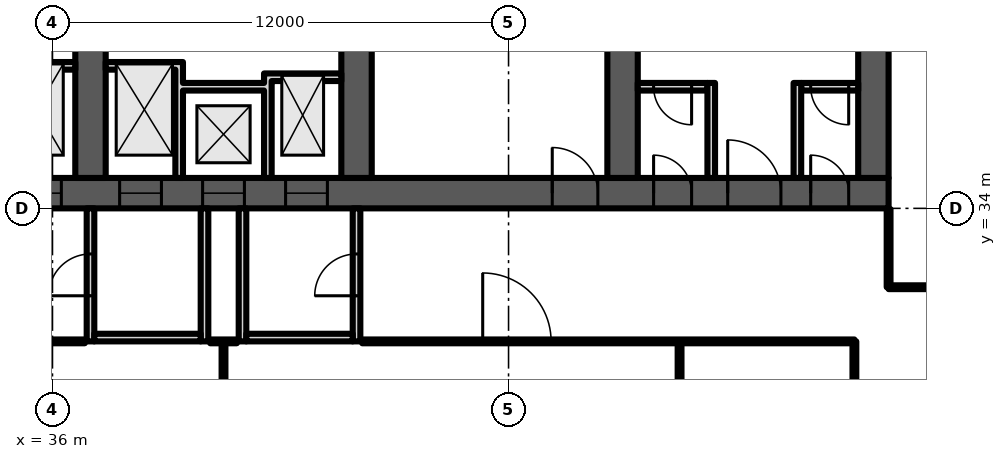
"""IFC4 building model, lengths in metres.
Left out: names, types, materials, properties, quantities, classifications, styles, units other than length and angle.
Written with IfcOpenShell. Run it as: python <this file> out.ifc"""

import sys

from ifc_helpers import new_model, si_unit, direction, frame, frame_2d, origin, place, context, subcontext, project, spatial, polyline, rectangle, outline, extrude, element, fill, save


model = new_model("IFC4")
c1 = context("Model", 3, precision=1e-05, world=origin(), true_north=direction((0.0, 1.0)))
c2 = subcontext(c1, "Body", "Model", "MODEL_VIEW")
j1 = project(units=[si_unit("LENGTHUNIT", "METRE"), si_unit("PLANEANGLEUNIT", "RADIAN")], contexts=[c1])
p1 = place(None, origin())
s1 = spatial("IfcSite", under=j1, at=p1, CompositionType="ELEMENT")
p2 = place(p1, origin())
s2 = spatial("IfcBuilding", under=s1, at=p2, CompositionType="ELEMENT")
p3 = place(p2, frame((0.0, 0.0, 177.1)))
s3 = spatial("IfcBuildingStorey", under=s2, at=p3, CompositionType="ELEMENT", Elevation=177.1)
p4 = place(p3, frame((16.0, 34.4, 0.0), z_axis=(0.0, 0.0, 1.0), x_axis=(1.0, 0.0, 0.0)))
e1 = element("IfcWall", 1, at=p4, inside=s3, PredefinedType="SHEAR", context=c2, shape_type="SweptSolid", body=[
    extrude(rectangle(XDim=42.0, YDim=0.8, at=frame_2d((21.0, 0.0))), origin(), (0.0, 0.0, 1.0), 3.6),
])
p5 = place(p4, frame((1.75, 0.0, 0.0)))
e2 = element("IfcOpeningElement", 2, at=p5, cuts=e1, PredefinedType="OPENING", context=c2, shape_type="SweptSolid", body=[
    extrude(rectangle(XDim=1.0, YDim=2.1, at=frame_2d((0.5, 1.05))), frame((0.0, 0.41, 0.0), z_axis=(0.0, -1.0, 0.0), x_axis=(1.0, 0.0, 0.0)), (0.0, 0.0, 1.0), 0.82),
])
p6 = place(p4, frame((4.65, 0.0, 0.0)))
e3 = element("IfcOpeningElement", 3, at=p6, cuts=e1, PredefinedType="OPENING", context=c2, shape_type="SweptSolid", body=[
    extrude(rectangle(XDim=1.0, YDim=2.1, at=frame_2d((0.5, 1.05))), frame((0.0, 0.41, 0.0), z_axis=(0.0, -1.0, 0.0), x_axis=(1.0, 0.0, 0.0)), (0.0, 0.0, 1.0), 0.82),
])
p7 = place(p4, frame((7.65, 0.0, 0.0)))
e4 = element("IfcOpeningElement", 4, at=p7, cuts=e1, PredefinedType="OPENING", context=c2, shape_type="SweptSolid", body=[
    extrude(rectangle(XDim=1.2, YDim=2.1, at=frame_2d((0.6, 1.05))), frame((0.0, 0.41, 0.0), z_axis=(0.0, -1.0, 0.0), x_axis=(1.0, 0.0, 0.0)), (0.0, 0.0, 1.0), 0.82),
])
p8 = place(p4, frame((14.767, 0.0, 0.0)))
e5 = element("IfcOpeningElement", 5, at=p8, cuts=e1, PredefinedType="OPENING", context=c2, shape_type="SweptSolid", body=[
    extrude(rectangle(XDim=1.1, YDim=2.1, at=frame_2d((0.55, 1.05))), frame((0.0, 0.41, 0.0), z_axis=(0.0, -1.0, 0.0), x_axis=(1.0, 0.0, 0.0)), (0.0, 0.0, 1.0), 0.82),
])
p9 = place(p4, frame((19.133, 0.0, 0.0)))
e6 = element("IfcOpeningElement", 6, at=p9, cuts=e1, PredefinedType="OPENING", context=c2, shape_type="SweptSolid", body=[
    extrude(rectangle(XDim=1.1, YDim=2.1, at=frame_2d((0.55, 1.05))), frame((0.0, 0.41, 0.0), z_axis=(0.0, -1.0, 0.0), x_axis=(1.0, 0.0, 0.0)), (0.0, 0.0, 1.0), 0.82),
])
p10 = place(p4, frame((16.8, 0.0, 0.0)))
e7 = element("IfcOpeningElement", 7, at=p10, cuts=e1, PredefinedType="OPENING", context=c2, shape_type="SweptSolid", body=[
    extrude(rectangle(XDim=1.4, YDim=2.1, at=frame_2d((0.7, 1.05))), frame((0.0, 0.41, 0.0), z_axis=(0.0, -1.0, 0.0), x_axis=(1.0, 0.0, 0.0)), (0.0, 0.0, 1.0), 0.82),
])
p11 = place(p4, frame((21.767, 0.0, 0.0)))
e8 = element("IfcOpeningElement", 8, at=p11, cuts=e1, PredefinedType="OPENING", context=c2, shape_type="SweptSolid", body=[
    extrude(rectangle(XDim=1.1, YDim=2.1, at=frame_2d((0.55, 1.05))), frame((0.0, 0.41, 0.0), z_axis=(0.0, -1.0, 0.0), x_axis=(1.0, 0.0, 0.0)), (0.0, 0.0, 1.0), 0.82),
])
p12 = place(p4, frame((23.95, 0.0, 0.0)))
e9 = element("IfcOpeningElement", 9, at=p12, cuts=e1, PredefinedType="OPENING", context=c2, shape_type="SweptSolid", body=[
    extrude(rectangle(XDim=1.1, YDim=2.1, at=frame_2d((0.55, 1.05))), frame((0.0, 0.41, 0.0), z_axis=(0.0, -1.0, 0.0), x_axis=(1.0, 0.0, 0.0)), (0.0, 0.0, 1.0), 0.82),
])
p13 = place(p4, frame((26.133, 0.0, 0.0)))
e10 = element("IfcOpeningElement", 10, at=p13, cuts=e1, PredefinedType="OPENING", context=c2, shape_type="SweptSolid", body=[
    extrude(rectangle(XDim=1.1, YDim=2.1, at=frame_2d((0.55, 1.05))), frame((0.0, 0.41, 0.0), z_axis=(0.0, -1.0, 0.0), x_axis=(1.0, 0.0, 0.0)), (0.0, 0.0, 1.0), 0.82),
])
p14 = place(p4, frame((33.15, 0.0, 0.0)))
e11 = element("IfcOpeningElement", 11, at=p14, cuts=e1, PredefinedType="OPENING", context=c2, shape_type="SweptSolid", body=[
    extrude(rectangle(XDim=1.2, YDim=2.1, at=frame_2d((0.6, 1.05))), frame((0.0, 0.41, 0.0), z_axis=(0.0, -1.0, 0.0), x_axis=(1.0, 0.0, 0.0)), (0.0, 0.0, 1.0), 0.82),
])
p15 = place(p4, frame((35.817, 0.0, 0.0)))
e12 = element("IfcOpeningElement", 12, at=p15, cuts=e1, PredefinedType="OPENING", context=c2, shape_type="SweptSolid", body=[
    extrude(rectangle(XDim=1.0, YDim=2.1, at=frame_2d((0.5, 1.05))), frame((0.0, 0.41, 0.0), z_axis=(0.0, -1.0, 0.0), x_axis=(1.0, 0.0, 0.0)), (0.0, 0.0, 1.0), 0.82),
])
p16 = place(p4, frame((39.95, 0.0, 0.0)))
e13 = element("IfcOpeningElement", 13, at=p16, cuts=e1, PredefinedType="OPENING", context=c2, shape_type="SweptSolid", body=[
    extrude(rectangle(XDim=1.0, YDim=2.1, at=frame_2d((0.5, 1.05))), frame((0.0, 0.41, 0.0), z_axis=(0.0, -1.0, 0.0), x_axis=(1.0, 0.0, 0.0)), (0.0, 0.0, 1.0), 0.82),
])
p17 = place(p4, frame((37.767, 0.0, 0.0)))
e14 = element("IfcOpeningElement", 14, at=p17, cuts=e1, PredefinedType="OPENING", context=c2, shape_type="SweptSolid", body=[
    extrude(rectangle(XDim=1.4, YDim=2.1, at=frame_2d((0.7, 1.05))), frame((0.0, 0.41, 0.0), z_axis=(0.0, -1.0, 0.0), x_axis=(1.0, 0.0, 0.0)), (0.0, 0.0, 1.0), 0.82),
])
p18 = place(p3, frame((37.0, 34.8, 0.0), z_axis=(0.0, 0.0, 1.0), x_axis=(0.0, 1.0, 0.0)))
e15 = element("IfcWall", 15, at=p18, inside=s3, PredefinedType="SHEAR", context=c2, shape_type="SweptSolid", body=[
    extrude(rectangle(XDim=14.987, YDim=0.8, at=frame_2d((7.493, 0.0))), origin(), (0.0, 0.0, 1.0), 3.6),
])
p19 = place(p18, frame((11.312, 0.0, 0.0)))
e16 = element("IfcOpeningElement", 16, at=p19, cuts=e15, PredefinedType="OPENING", context=c2, shape_type="SweptSolid", body=[
    extrude(rectangle(XDim=1.0, YDim=2.1, at=frame_2d((0.5, 1.05))), frame((0.0, 0.41, 0.0), z_axis=(0.0, -1.0, 0.0), x_axis=(1.0, 0.0, 0.0)), (0.0, 0.0, 1.0), 0.82),
])
p20 = place(p18, frame((3.6, 0.0, 0.0)))
e17 = element("IfcOpeningElement", 17, at=p20, cuts=e15, PredefinedType="OPENING", context=c2, shape_type="SweptSolid", body=[
    extrude(rectangle(XDim=1.1, YDim=2.1, at=frame_2d((0.55, 1.05))), frame((0.0, 0.41, 0.0), z_axis=(0.0, -1.0, 0.0), x_axis=(1.0, 0.0, 0.0)), (0.0, 0.0, 1.0), 0.82),
])
p21 = place(p3, frame((44.0, 34.8, 0.0), z_axis=(0.0, 0.0, 1.0), x_axis=(0.0, 1.0, 0.0)))
e18 = element("IfcWall", 18, at=p21, inside=s3, PredefinedType="SHEAR", context=c2, shape_type="SweptSolid", body=[
    extrude(rectangle(XDim=14.374, YDim=0.8, at=frame_2d((7.187, 0.0))), origin(), (0.0, 0.0, 1.0), 3.6),
])
p22 = place(p21, frame((11.312, 0.0, 0.0)))
e19 = element("IfcOpeningElement", 19, at=p22, cuts=e18, PredefinedType="OPENING", context=c2, shape_type="SweptSolid", body=[
    extrude(rectangle(XDim=1.0, YDim=2.1, at=frame_2d((0.5, 1.05))), frame((0.0, 0.41, 0.0), z_axis=(0.0, -1.0, 0.0), x_axis=(1.0, 0.0, 0.0)), (0.0, 0.0, 1.0), 0.82),
])
p23 = place(p21, frame((3.6, 0.0, 0.0)))
e20 = element("IfcOpeningElement", 20, at=p23, cuts=e18, PredefinedType="OPENING", context=c2, shape_type="SweptSolid", body=[
    extrude(rectangle(XDim=1.1, YDim=2.1, at=frame_2d((0.55, 1.05))), frame((0.0, 0.41, 0.0), z_axis=(0.0, -1.0, 0.0), x_axis=(1.0, 0.0, 0.0)), (0.0, 0.0, 1.0), 0.82),
])
p24 = place(p3, frame((51.0, 34.8, 0.0), z_axis=(0.0, 0.0, 1.0), x_axis=(0.0, 1.0, 0.0)))
e21 = element("IfcWall", 21, at=p24, inside=s3, PredefinedType="SHEAR", context=c2, shape_type="SweptSolid", body=[
    extrude(rectangle(XDim=13.762, YDim=0.8, at=frame_2d((6.881, 0.0))), origin(), (0.0, 0.0, 1.0), 3.6),
])
p25 = place(p24, frame((3.6, 0.0, 0.0)))
e22 = element("IfcOpeningElement", 22, at=p25, cuts=e21, PredefinedType="OPENING", context=c2, shape_type="SweptSolid", body=[
    extrude(rectangle(XDim=1.1, YDim=2.1, at=frame_2d((0.55, 1.05))), frame((0.0, 0.41, 0.0), z_axis=(0.0, -1.0, 0.0), x_axis=(1.0, 0.0, 0.0)), (0.0, 0.0, 1.0), 0.82),
])
p26 = place(p3, frame((57.6, 34.8, 0.0), z_axis=(0.0, 0.0, 1.0), x_axis=(0.0, 1.0, 0.0)))
e23 = element("IfcWall", 23, at=p26, inside=s3, PredefinedType="SHEAR", context=c2, shape_type="SweptSolid", body=[
    extrude(rectangle(XDim=13.184, YDim=0.8, at=frame_2d((6.592, 0.0))), origin(), (0.0, 0.0, 1.0), 3.6),
])
p27 = place(p3, frame((0.0, 0.0, -0.0)))
e24 = element("IfcWall", 24, at=p27, inside=s3, PredefinedType="PARTITIONING", context=c2, shape_type="SweptSolid", body=[
    extrude(outline(polyline([(34.567, 37.85), (34.767, 37.85), (36.6, 37.85), (36.6, 37.65), (34.767, 37.65), (34.767, 34.8), (34.567, 34.8), (34.567, 37.85)])), origin(), (0.0, 0.0, 1.0), 3.2),
])
p28 = place(p3, frame((0.0, 0.0, -0.0)))
e25 = element("IfcWall", 25, at=p28, inside=s3, PredefinedType="PARTITIONING", context=c2, shape_type="SweptSolid", body=[
    extrude(outline(polyline([(41.567, 37.1), (39.433, 37.1), (39.433, 34.8), (39.233, 34.8), (39.233, 37.65), (37.4, 37.65), (37.4, 37.85), (39.233, 37.85), (39.433, 37.85), (39.433, 37.3), (41.567, 37.3), (41.567, 37.55), (41.767, 37.55), (43.6, 37.55), (43.6, 37.35), (41.767, 37.35), (41.767, 34.8), (41.567, 34.8), (41.567, 37.1)])), origin(), (0.0, 0.0, 1.0), 3.2),
])
p29 = place(p3, frame((51.4, 37.2, 0.0), z_axis=(0.0, 0.0, 1.0), x_axis=(1.0, 0.0, 0.0)))
e26 = element("IfcWall", 26, at=p29, inside=s3, PredefinedType="PARTITIONING", context=c2, shape_type="SweptSolid", body=[
    extrude(rectangle(XDim=1.833, YDim=0.2, at=frame_2d((0.917, 0.0))), origin(), (0.0, 0.0, 1.0), 3.2),
])
p30 = place(p29, frame((0.417, 0.0, 0.0)))
e27 = element("IfcOpeningElement", 27, at=p30, cuts=e26, PredefinedType="OPENING", context=c2, shape_type="SweptSolid", body=[
    extrude(rectangle(XDim=1.0, YDim=2.1, at=frame_2d((0.5, 1.05))), frame((0.0, 0.11, 0.0), z_axis=(0.0, -1.0, 0.0), x_axis=(1.0, 0.0, 0.0)), (0.0, 0.0, 1.0), 0.22),
])
p31 = place(p3, frame((55.7, 37.2, 0.0), z_axis=(0.0, 0.0, 1.0), x_axis=(1.0, 0.0, 0.0)))
e28 = element("IfcWall", 28, at=p31, inside=s3, PredefinedType="PARTITIONING", context=c2, shape_type="SweptSolid", body=[
    extrude(rectangle(XDim=1.5, YDim=0.2, at=frame_2d((0.75, 0.0))), origin(), (0.0, 0.0, 1.0), 3.2),
])
p32 = place(p31, frame((0.25, 0.0, 0.0)))
e29 = element("IfcOpeningElement", 29, at=p32, cuts=e28, PredefinedType="OPENING", context=c2, shape_type="SweptSolid", body=[
    extrude(rectangle(XDim=1.0, YDim=2.1, at=frame_2d((0.5, 1.05))), frame((0.0, 0.11, 0.0), z_axis=(0.0, -1.0, 0.0), x_axis=(1.0, 0.0, 0.0)), (0.0, 0.0, 1.0), 0.22),
])
p33 = place(p3, frame((0.0, 0.0, -0.0)))
e30 = element("IfcWall", 30, at=p33, inside=s3, PredefinedType="PARTITIONING", context=c2, shape_type="SweptSolid", body=[
    extrude(outline(polyline([(53.233, 34.8), (53.233, 37.3), (53.433, 37.3), (53.433, 34.8), (53.233, 34.8)])), origin(), (0.0, 0.0, 1.0), 3.2),
])
p34 = place(p3, frame((0.0, 0.0, -0.0)))
e31 = element("IfcWall", 31, at=p34, inside=s3, PredefinedType="PARTITIONING", context=c2, shape_type="SweptSolid", body=[
    extrude(outline(polyline([(55.5, 34.8), (55.5, 37.3), (55.7, 37.3), (55.7, 34.8), (55.5, 34.8)])), origin(), (0.0, 0.0, 1.0), 3.2),
])
p35 = place(p3, frame((37.0, 30.5, 0.0), z_axis=(0.0, 0.0, 1.0), x_axis=(0.0, 1.0, 0.0)))
e32 = element("IfcWall", 32, at=p35, inside=s3, PredefinedType="PARTITIONING", context=c2, shape_type="SweptSolid", body=[
    extrude(rectangle(XDim=3.5, YDim=0.2, at=frame_2d((1.75, 0.0))), origin(), (0.0, 0.0, 1.0), 3.2),
])
p36 = place(p35, frame((1.2, 0.0, 0.0)))
e33 = element("IfcOpeningElement", 33, at=p36, cuts=e32, PredefinedType="OPENING", context=c2, shape_type="SweptSolid", body=[
    extrude(rectangle(XDim=1.1, YDim=2.1, at=frame_2d((0.55, 1.05))), frame((0.0, 0.11, 0.0), z_axis=(0.0, -1.0, 0.0), x_axis=(1.0, 0.0, 0.0)), (0.0, 0.0, 1.0), 0.22),
])
p37 = place(p3, frame((40.0, 30.5, 0.0), z_axis=(0.0, 0.0, 1.0), x_axis=(0.0, 1.0, 0.0)))
e34 = element("IfcWall", 34, at=p37, inside=s3, PredefinedType="PARTITIONING", context=c2, shape_type="SweptSolid", body=[
    extrude(rectangle(XDim=3.5, YDim=0.2, at=frame_2d((1.75, 0.0))), origin(), (0.0, 0.0, 1.0), 3.2),
])
p38 = place(p3, frame((37.1, 30.6, 0.0), z_axis=(0.0, 0.0, 1.0), x_axis=(1.0, 0.0, 0.0)))
e35 = element("IfcWall", 35, at=p38, inside=s3, PredefinedType="PARTITIONING", context=c2, shape_type="SweptSolid", body=[
    extrude(rectangle(XDim=2.8, YDim=0.2, at=frame_2d((1.4, 0.0))), origin(), (0.0, 0.0, 1.0), 3.2),
])
p39 = place(p3, frame((41.0, 30.5, 0.0), z_axis=(0.0, 0.0, 1.0), x_axis=(0.0, 1.0, 0.0)))
e36 = element("IfcWall", 36, at=p39, inside=s3, PredefinedType="PARTITIONING", context=c2, shape_type="SweptSolid", body=[
    extrude(rectangle(XDim=3.5, YDim=0.2, at=frame_2d((1.75, 0.0))), origin(), (0.0, 0.0, 1.0), 3.2),
])
p40 = place(p3, frame((44.0, 30.5, 0.0), z_axis=(0.0, 0.0, 1.0), x_axis=(0.0, 1.0, 0.0)))
e37 = element("IfcWall", 37, at=p40, inside=s3, PredefinedType="PARTITIONING", context=c2, shape_type="SweptSolid", body=[
    extrude(rectangle(XDim=3.5, YDim=0.2, at=frame_2d((1.75, 0.0))), origin(), (0.0, 0.0, 1.0), 3.2),
])
p41 = place(p40, frame((1.2, 0.0, 0.0)))
e38 = element("IfcOpeningElement", 38, at=p41, cuts=e37, PredefinedType="OPENING", context=c2, shape_type="SweptSolid", body=[
    extrude(rectangle(XDim=1.1, YDim=2.1, at=frame_2d((0.55, 1.05))), frame((0.0, 0.11, 0.0), z_axis=(0.0, -1.0, 0.0), x_axis=(1.0, 0.0, 0.0)), (0.0, 0.0, 1.0), 0.22),
])
p42 = place(p3, frame((41.1, 30.6, 0.0), z_axis=(0.0, 0.0, 1.0), x_axis=(1.0, 0.0, 0.0)))
e39 = element("IfcWall", 39, at=p42, inside=s3, PredefinedType="PARTITIONING", context=c2, shape_type="SweptSolid", body=[
    extrude(rectangle(XDim=2.8, YDim=0.2, at=frame_2d((1.4, 0.0))), origin(), (0.0, 0.0, 1.0), 3.2),
])
p43 = place(p3, frame((17.8, 30.5, 0.0), z_axis=(0.0, 0.0, 1.0), x_axis=(1.0, 0.0, 0.0)))
e40 = element("IfcWall", 40, at=p43, inside=s3, PredefinedType="PARTITIONING", context=c2, shape_type="SweptSolid", body=[
    extrude(rectangle(XDim=19.05, YDim=0.1, at=frame_2d((9.525, 0.0))), origin(), (0.0, 0.0, 1.0), 3.2),
])
p44 = place(p3, frame((40.5, 1.489, 0.0), z_axis=(0.0, 0.0, 1.0), x_axis=(0.0, 1.0, 0.0)))
e41 = element("IfcWall", 41, at=p44, inside=s3, PredefinedType="PARTITIONING", context=c2, shape_type="SweptSolid", body=[
    extrude(rectangle(XDim=29.011, YDim=0.1, at=frame_2d((14.505, 0.0))), origin(), (0.0, 0.0, 1.0), 3.2),
])
p45 = place(p3, frame((52.5, 1.98, 0.0), z_axis=(0.0, 0.0, 1.0), x_axis=(0.0, 1.0, 0.0)))
e42 = element("IfcWall", 42, at=p45, inside=s3, PredefinedType="PARTITIONING", context=c2, shape_type="SweptSolid", body=[
    extrude(rectangle(XDim=28.52, YDim=0.1, at=frame_2d((14.26, 0.0))), origin(), (0.0, 0.0, 1.0), 3.2),
])
p46 = place(p3, frame((57.1, 11.985, 0.0), z_axis=(0.0, 0.0, 1.0), x_axis=(0.0, 1.0, 0.0)))
e43 = element("IfcWall", 43, at=p46, inside=s3, PredefinedType="PARTITIONING", context=c2, shape_type="SweptSolid", body=[
    extrude(rectangle(XDim=18.515, YDim=0.1, at=frame_2d((9.257, 0.0))), origin(), (0.0, 0.0, 1.0), 3.2),
])
p47 = place(p46, frame((8.295, 0.0, 0.0)))
e44 = element("IfcOpeningElement", 44, at=p47, cuts=e43, PredefinedType="OPENING", context=c2, shape_type="SweptSolid", body=[
    extrude(rectangle(XDim=1.8, YDim=2.1, at=frame_2d((0.9, 1.05))), frame((0.0, 0.06, 0.0), z_axis=(0.0, -1.0, 0.0), x_axis=(1.0, 0.0, 0.0)), (0.0, 0.0, 1.0), 0.12),
])
p48 = place(p3, frame((58.0, 31.925, 0.0), z_axis=(0.0, 0.0, 1.0), x_axis=(0.0, 1.0, 0.0)))
e45 = element("IfcWall", 45, at=p48, inside=s3, PredefinedType="PARTITIONING", context=c2, shape_type="SweptSolid", body=[
    extrude(rectangle(XDim=2.055, YDim=0.1, at=frame_2d((1.027, 0.0))), origin(), (0.0, 0.0, 1.0), 3.2),
])
p49 = place(p3, frame((58.0, 31.925, 0.0), z_axis=(0.0, 0.0, 1.0), x_axis=(1.0, 0.0, 0.0)))
e46 = element("IfcWall", 46, at=p49, inside=s3, PredefinedType="PARTITIONING", context=c2, shape_type="SweptSolid", body=[
    extrude(rectangle(XDim=1.425, YDim=0.1, at=frame_2d((0.712, 0.0))), origin(), (0.0, 0.0, 1.0), 3.2),
])
p50 = place(p3, frame((58.9, 27.435, 0.0), z_axis=(0.0, 0.0, 1.0), x_axis=(0.178584, 0.983924, 0.0)))
e47 = element("IfcWall", 47, at=p50, inside=s3, PredefinedType="PARTITIONING", context=c2, shape_type="SweptSolid", body=[
    extrude(rectangle(XDim=2.353, YDim=0.1, at=frame_2d((1.176, 0.0))), origin(), (0.0, 0.0, 1.0), 3.2),
])
p51 = place(p3, frame((40.15, 30.5, 0.0), z_axis=(0.0, 0.0, 1.0), x_axis=(1.0, 0.0, 0.0)))
e48 = element("IfcWall", 48, at=p51, inside=s3, PredefinedType="PARTITIONING", context=c2, shape_type="SweptSolid", body=[
    extrude(rectangle(XDim=0.7, YDim=0.1, at=frame_2d((0.35, 0.0))), origin(), (0.0, 0.0, 1.0), 3.2),
])
p52 = place(p3, frame((44.15, 30.5, 0.0), z_axis=(0.0, 0.0, 1.0), x_axis=(1.0, 0.0, 0.0)))
e49 = element("IfcWall", 49, at=p52, inside=s3, PredefinedType="PARTITIONING", context=c2, shape_type="SweptSolid", body=[
    extrude(rectangle(XDim=12.95, YDim=0.1, at=frame_2d((6.475, 0.0))), origin(), (0.0, 0.0, 1.0), 3.2),
])
p53 = place(p52, frame((3.17, 0.0, 0.0)))
e50 = element("IfcOpeningElement", 50, at=p53, cuts=e49, PredefinedType="OPENING", context=c2, shape_type="SweptSolid", body=[
    extrude(rectangle(XDim=1.8, YDim=2.1, at=frame_2d((0.9, 1.05))), frame((0.0, 0.06, 0.0), z_axis=(0.0, -1.0, 0.0), x_axis=(1.0, 0.0, 0.0)), (0.0, 0.0, 1.0), 0.12),
])
p54 = place(p9, origin())
e51 = element("IfcDoor", 51, at=p54, inside=s3, OperationType="DOUBLE_DOOR_SLIDING", PredefinedType="DOOR", context=c2, shape_type="SweptSolid", body=[
    extrude(rectangle(XDim=1.1, YDim=2.1, at=frame_2d((0.55, 1.05))), frame((0.0, 0.025, 0.0), z_axis=(0.0, -1.0, 0.0), x_axis=(1.0, 0.0, 0.0)), (0.0, 0.0, 1.0), 0.05),
])
fill(e6, e51)
p55 = place(p11, origin())
e52 = element("IfcDoor", 52, at=p55, inside=s3, OperationType="DOUBLE_DOOR_SLIDING", PredefinedType="DOOR", context=c2, shape_type="SweptSolid", body=[
    extrude(rectangle(XDim=1.1, YDim=2.1, at=frame_2d((0.55, 1.05))), frame((0.0, 0.025, 0.0), z_axis=(0.0, -1.0, 0.0), x_axis=(1.0, 0.0, 0.0)), (0.0, 0.0, 1.0), 0.05),
])
fill(e8, e52)
p56 = place(p12, origin())
e53 = element("IfcDoor", 53, at=p56, inside=s3, OperationType="DOUBLE_DOOR_SLIDING", PredefinedType="DOOR", context=c2, shape_type="SweptSolid", body=[
    extrude(rectangle(XDim=1.1, YDim=2.1, at=frame_2d((0.55, 1.05))), frame((0.0, 0.025, 0.0), z_axis=(0.0, -1.0, 0.0), x_axis=(1.0, 0.0, 0.0)), (0.0, 0.0, 1.0), 0.05),
])
fill(e9, e53)
p57 = place(p13, origin())
e54 = element("IfcDoor", 54, at=p57, inside=s3, OperationType="DOUBLE_DOOR_SLIDING", PredefinedType="DOOR", context=c2, shape_type="SweptSolid", body=[
    extrude(rectangle(XDim=1.1, YDim=2.1, at=frame_2d((0.55, 1.05))), frame((0.0, 0.025, 0.0), z_axis=(0.0, -1.0, 0.0), x_axis=(1.0, 0.0, 0.0)), (0.0, 0.0, 1.0), 0.05),
])
fill(e10, e54)
p58 = place(p14, origin())
e55 = element("IfcDoor", 55, at=p58, inside=s3, OperationType="SINGLE_SWING_LEFT", PredefinedType="DOOR", context=c2, shape_type="SweptSolid", body=[
    extrude(rectangle(XDim=1.2, YDim=2.1, at=frame_2d((0.6, 1.05))), frame((0.0, 0.025, 0.0), z_axis=(0.0, -1.0, 0.0), x_axis=(1.0, 0.0, 0.0)), (0.0, 0.0, 1.0), 0.05),
])
fill(e11, e55)
p59 = place(p15, origin())
e56 = element("IfcDoor", 56, at=p59, inside=s3, OperationType="SINGLE_SWING_LEFT", PredefinedType="DOOR", context=c2, shape_type="SweptSolid", body=[
    extrude(rectangle(XDim=1.0, YDim=2.1, at=frame_2d((0.5, 1.05))), frame((0.0, 0.4, 0.0), z_axis=(0.0, -1.0, 0.0), x_axis=(1.0, 0.0, 0.0)), (0.0, 0.0, 1.0), 0.8),
])
fill(e12, e56)
p60 = place(p30, origin())
e57 = element("IfcDoor", 57, at=p60, inside=s3, OperationType="SINGLE_SWING_RIGHT", PredefinedType="DOOR", context=c2, shape_type="SweptSolid", body=[
    extrude(rectangle(XDim=1.0, YDim=2.1, at=frame_2d((0.5, 1.05))), frame((0.0, 0.025, 0.0), z_axis=(0.0, -1.0, 0.0), x_axis=(1.0, 0.0, 0.0)), (0.0, 0.0, 1.0), 0.05),
])
fill(e27, e57)
p61 = place(p16, origin())
e58 = element("IfcDoor", 58, at=p61, inside=s3, OperationType="SINGLE_SWING_LEFT", PredefinedType="DOOR", context=c2, shape_type="SweptSolid", body=[
    extrude(rectangle(XDim=1.0, YDim=2.1, at=frame_2d((0.5, 1.05))), frame((0.0, 0.4, 0.0), z_axis=(0.0, -1.0, 0.0), x_axis=(1.0, 0.0, 0.0)), (0.0, 0.0, 1.0), 0.8),
])
fill(e13, e58)
p62 = place(p32, origin())
e59 = element("IfcDoor", 59, at=p62, inside=s3, OperationType="SINGLE_SWING_RIGHT", PredefinedType="DOOR", context=c2, shape_type="SweptSolid", body=[
    extrude(rectangle(XDim=1.0, YDim=2.1, at=frame_2d((0.5, 1.05))), frame((0.0, 0.025, 0.0), z_axis=(0.0, -1.0, 0.0), x_axis=(1.0, 0.0, 0.0)), (0.0, 0.0, 1.0), 0.05),
])
fill(e29, e59)
p63 = place(p17, origin())
e60 = element("IfcDoor", 60, at=p63, inside=s3, OperationType="DOUBLE_DOOR_SINGLE_SWING", PredefinedType="DOOR", context=c2, shape_type="SweptSolid", body=[
    extrude(rectangle(XDim=1.4, YDim=2.1, at=frame_2d((0.7, 1.05))), frame((0.0, 0.025, 0.0), z_axis=(0.0, -1.0, 0.0), x_axis=(1.0, 0.0, 0.0)), (0.0, 0.0, 1.0), 0.05),
])
fill(e14, e60)
p64 = place(p36, origin())
e61 = element("IfcDoor", 61, at=p64, inside=s3, OperationType="SINGLE_SWING_LEFT", PredefinedType="DOOR", context=c2, shape_type="SweptSolid", body=[
    extrude(rectangle(XDim=1.1, YDim=2.1, at=frame_2d((0.55, 1.05))), frame((0.0, 0.025, 0.0), z_axis=(0.0, -1.0, 0.0), x_axis=(1.0, 0.0, 0.0)), (0.0, 0.0, 1.0), 0.05),
])
fill(e33, e61)
p65 = place(p41, origin())
e62 = element("IfcDoor", 62, at=p65, inside=s3, OperationType="SINGLE_SWING_LEFT", PredefinedType="DOOR", context=c2, shape_type="SweptSolid", body=[
    extrude(rectangle(XDim=1.1, YDim=2.1, at=frame_2d((0.55, 1.05))), frame((0.0, 0.025, 0.0), z_axis=(0.0, -1.0, 0.0), x_axis=(1.0, 0.0, 0.0)), (0.0, 0.0, 1.0), 0.05),
])
fill(e38, e62)
p66 = place(p53, origin())
e63 = element("IfcDoor", 63, at=p66, inside=s3, OperationType="DOUBLE_DOOR_SINGLE_SWING", PredefinedType="DOOR", context=c2, shape_type="SweptSolid", body=[
    extrude(rectangle(XDim=1.8, YDim=2.1, at=frame_2d((0.9, 1.05))), frame((0.0, 0.025, 0.0), z_axis=(0.0, -1.0, 0.0), x_axis=(1.0, 0.0, 0.0)), (0.0, 0.0, 1.0), 0.05),
])
fill(e50, e63)
save(model, sys.argv[1])
